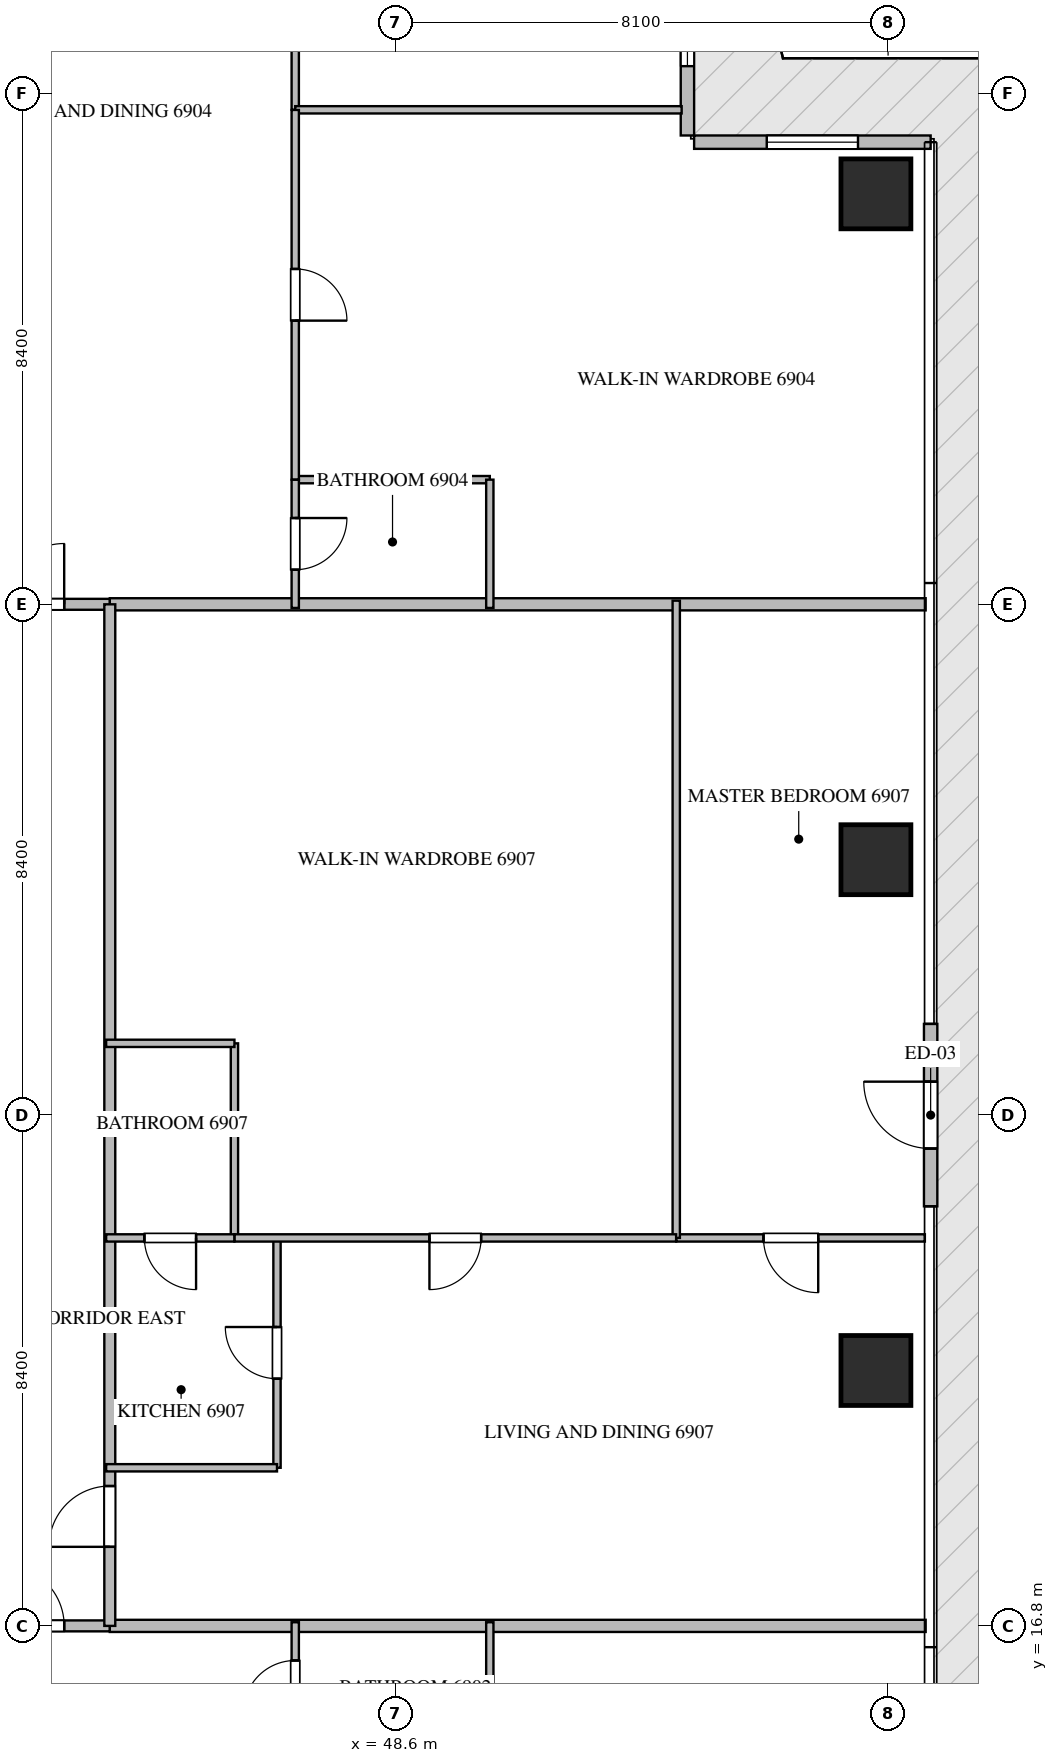
"""IFC4 building model, lengths in metres.
Left out: names, types, materials, properties, quantities, classifications, styles, units other than length and angle.
Written with IfcOpenShell. Run it as: python <this file> out.ifc"""

import sys

from ifc_helpers import new_model, si_unit, direction, frame, frame_2d, origin, origin_2d, place, context, subcontext, project, spatial, rectangle, extrude, source, transform, mapped, element, fill, save


model = new_model("IFC4")
c1 = context("Model", 3, precision=1e-05, world=origin(), true_north=direction((0.0, 1.0)))
c2 = subcontext(c1, "Body", "Model", "MODEL_VIEW")
j1 = project(units=[si_unit("LENGTHUNIT", "METRE"), si_unit("PLANEANGLEUNIT", "RADIAN")], contexts=[c1])
p1 = place(None, origin())
s1 = spatial("IfcSite", under=j1, at=p1, CompositionType="ELEMENT")
p2 = place(p1, origin())
s2 = spatial("IfcBuilding", under=s1, at=p2, CompositionType="ELEMENT")
p3 = place(p2, frame((0.0, 0.0, 275.9)))
s3 = spatial("IfcBuildingStorey", under=s2, at=p3, CompositionType="ELEMENT", Elevation=275.9)
m1 = source(origin(), c2, "Body", "SweptSolid", [
    extrude(rectangle(XDim=1.15, YDim=1.15, at=origin_2d()), origin(), (0.0, 0.0, 1.0), 3.85),
])
for number, where, z_axis, x_axis in (
    (1, (56.5, 21.0, -0.26), (0.0, 0.0, 1.0), (1.0, 0.0, 0.0)),
    (2, (56.5, 29.4, -0.26), (0.0, 0.0, 1.0), (1.0, 0.0, 0.0)),
    (3, (56.5, 40.35, -0.26), (0.0, 0.0, 1.0), (1.0, 0.0, 0.0)),
):
    element("IfcColumn", number, at=place(p3, frame(where, z_axis=z_axis, x_axis=x_axis)), inside=s3, PredefinedType="COLUMN", context=c2, shape_type="MappedRepresentation", body=[
        mapped(m1, transform((0.0, 0.0, 0.0), scale=1.0)),
    ])
p4 = place(p3, frame((57.4, 23.7, 0.0), z_axis=(0.0, 0.0, 1.0), x_axis=(0.0, 1.0, 0.0)))
e4 = element("IfcWall", 4, at=p4, inside=s3, PredefinedType="ELEMENTEDWALL", context=c2, shape_type="SweptSolid", body=[
    extrude(rectangle(XDim=3.0, YDim=0.22, at=frame_2d((1.5, 0.0))), origin(), (0.0, 0.0, 1.0), 3.575),
])
p5 = place(p4, frame((0.95, 0.0, 0.0)))
e5 = element("IfcOpeningElement", 5, at=p5, cuts=e4, PredefinedType="OPENING", context=c2, shape_type="SweptSolid", body=[
    extrude(rectangle(XDim=1.1, YDim=2.2, at=frame_2d((0.55, 1.1))), frame((0.0, 0.12, 0.0), z_axis=(0.0, -1.0, 0.0), x_axis=(1.0, 0.0, 0.0)), (0.0, 0.0, 1.0), 0.24),
])
p6 = place(p3, frame((57.4, 41.2, 0.0), z_axis=(0.0, 0.0, 1.0), x_axis=(-1.0, 0.0, 0.0)))
e6 = element("IfcWall", 6, at=p6, inside=s3, PredefinedType="ELEMENTEDWALL", context=c2, shape_type="SweptSolid", body=[
    extrude(rectangle(XDim=3.89, YDim=0.22, at=frame_2d((1.945, 0.0))), origin(), (0.0, 0.0, 1.0), 3.575),
])
p7 = place(p6, frame((1.195, 0.0, 0.65)))
e7 = element("IfcOpeningElement", 7, at=p7, cuts=e6, PredefinedType="OPENING", context=c2, shape_type="SweptSolid", body=[
    extrude(rectangle(XDim=1.5, YDim=2.25, at=frame_2d((0.75, 1.125))), frame((0.0, 0.12, 0.0), z_axis=(0.0, -1.0, 0.0), x_axis=(1.0, 0.0, 0.0)), (0.0, 0.0, 1.0), 0.24),
])
p8 = place(p3, frame((53.4, 41.31, 0.0), z_axis=(0.0, 0.0, 1.0), x_axis=(0.0, 1.0, 0.0)))
e8 = element("IfcWall", 8, at=p8, inside=s3, PredefinedType="ELEMENTEDWALL", context=c2, shape_type="SweptSolid", body=[
    extrude(rectangle(XDim=3.78, YDim=0.22, at=frame_2d((1.89, 0.0))), origin(), (0.0, 0.0, 1.0), 3.575),
])
p9 = place(p8, frame((1.14, 0.0, 0.65)))
e9 = element("IfcOpeningElement", 9, at=p9, cuts=e8, PredefinedType="OPENING", context=c2, shape_type="SweptSolid", body=[
    extrude(rectangle(XDim=1.5, YDim=2.25, at=frame_2d((0.75, 1.125))), frame((0.0, 0.12, 0.0), z_axis=(0.0, -1.0, 0.0), x_axis=(1.0, 0.0, 0.0)), (0.0, 0.0, 1.0), 0.24),
])
for number, where, z_axis, x_axis in (
    (10, (43.9, 16.8, 0.0), (0.0, 0.0, 1.0), (1.0, 0.0, 0.0)),
    (11, (43.9, 33.6, 0.0), (0.0, 0.0, 1.0), (1.0, 0.0, 0.0)),
):
    element("IfcWall", number, at=place(p3, frame(where, z_axis=z_axis, x_axis=x_axis)), inside=s3, PredefinedType="PARTITIONING", context=c2, shape_type="SweptSolid", body=[
        extrude(rectangle(XDim=13.418, YDim=0.2, at=frame_2d((6.709, 0.0))), origin(), (0.0, 0.0, 1.0), 3.59),
    ])
p10 = place(p3, frame((41.402, 16.8, 0.0), z_axis=(0.0, 0.0, 1.0), x_axis=(1.0, 0.0, 0.0)))
e12 = element("IfcWall", 12, at=p10, inside=s3, PredefinedType="PARTITIONING", context=c2, shape_type="SweptSolid", body=[
    extrude(rectangle(XDim=2.496, YDim=0.18, at=frame_2d((1.248, 0.0))), origin(), (0.0, 0.0, 1.0), 3.59),
])
p11 = place(p10, frame((0.748, 0.0, 0.0)))
e13 = element("IfcOpeningElement", 13, at=p11, cuts=e12, PredefinedType="OPENING", context=c2, shape_type="SweptSolid", body=[
    extrude(rectangle(XDim=1.0, YDim=2.15, at=frame_2d((0.5, 1.075))), frame((0.0, 0.1, 0.0), z_axis=(0.0, -1.0, 0.0), x_axis=(1.0, 0.0, 0.0)), (0.0, 0.0, 1.0), 0.2),
])
p12 = place(p3, frame((41.402, 33.6, 0.0), z_axis=(0.0, 0.0, 1.0), x_axis=(1.0, 0.0, 0.0)))
e14 = element("IfcWall", 14, at=p12, inside=s3, PredefinedType="PARTITIONING", context=c2, shape_type="SweptSolid", body=[
    extrude(rectangle(XDim=2.496, YDim=0.18, at=frame_2d((1.248, 0.0))), origin(), (0.0, 0.0, 1.0), 3.59),
])
p13 = place(p12, frame((0.748, 0.0, 0.0)))
e15 = element("IfcOpeningElement", 15, at=p13, cuts=e14, PredefinedType="OPENING", context=c2, shape_type="SweptSolid", body=[
    extrude(rectangle(XDim=1.0, YDim=2.15, at=frame_2d((0.5, 1.075))), frame((0.0, 0.1, 0.0), z_axis=(0.0, -1.0, 0.0), x_axis=(1.0, 0.0, 0.0)), (0.0, 0.0, 1.0), 0.2),
])
p14 = place(p3, frame((43.9, 16.8, 0.0), z_axis=(0.0, 0.0, 1.0), x_axis=(0.0, 1.0, 0.0)))
e16 = element("IfcWall", 16, at=p14, inside=s3, PredefinedType="PARTITIONING", context=c2, shape_type="SweptSolid", body=[
    extrude(rectangle(XDim=16.8, YDim=0.18, at=frame_2d((8.4, 0.0))), origin(), (0.0, 0.0, 1.0), 3.59),
])
p15 = place(p14, frame((1.3, 0.0, 0.0)))
e17 = element("IfcOpeningElement", 17, at=p15, cuts=e16, PredefinedType="OPENING", context=c2, shape_type="SweptSolid", body=[
    extrude(rectangle(XDim=1.0, YDim=2.15, at=frame_2d((0.5, 1.075))), frame((0.0, 0.1, 0.0), z_axis=(0.0, -1.0, 0.0), x_axis=(1.0, 0.0, 0.0)), (0.0, 0.0, 1.0), 0.2),
])
p16 = place(p3, frame((50.15, 14.75, 0.0), z_axis=(0.0, 0.0, 1.0), x_axis=(0.0, 1.0, 0.0)))
e18 = element("IfcWall", 18, at=p16, inside=s3, PredefinedType="PARTITIONING", context=c2, shape_type="SweptSolid", body=[
    extrude(rectangle(XDim=2.11, YDim=0.12, at=frame_2d((1.055, 0.0))), origin(), (0.0, 0.0, 1.0), 3.59),
])
p17 = place(p3, frame((46.95, 14.752, 0.0), z_axis=(0.0, 0.0, 1.0), x_axis=(0.0, 1.0, 0.0)))
e19 = element("IfcWall", 19, at=p17, inside=s3, PredefinedType="PARTITIONING", context=c2, shape_type="SweptSolid", body=[
    extrude(rectangle(XDim=2.108, YDim=0.12, at=frame_2d((1.054, 0.0))), origin(), (0.0, 0.0, 1.0), 3.59),
])
p18 = place(p17, frame((0.629, 0.0, 0.0)))
e20 = element("IfcOpeningElement", 20, at=p18, cuts=e19, PredefinedType="OPENING", context=c2, shape_type="SweptSolid", body=[
    extrude(rectangle(XDim=0.85, YDim=2.1, at=frame_2d((0.425, 1.05))), frame((0.0, 0.07, 0.0), z_axis=(0.0, -1.0, 0.0), x_axis=(1.0, 0.0, 0.0)), (0.0, 0.0, 1.0), 0.14),
])
p19 = place(p3, frame((46.95, 49.105, 0.0), z_axis=(0.0, 0.0, 1.0), x_axis=(0.0, -1.0, 0.0)))
e21 = element("IfcWall", 21, at=p19, inside=s3, PredefinedType="PARTITIONING", context=c2, shape_type="SweptSolid", body=[
    extrude(rectangle(XDim=7.373, YDim=0.12, at=frame_2d((3.687, 0.0))), origin(), (0.0, 0.0, 1.0), 3.59),
])
p20 = place(p19, frame((3.56, 0.0, 0.0)))
e22 = element("IfcOpeningElement", 22, at=p20, cuts=e21, PredefinedType="OPENING", context=c2, shape_type="SweptSolid", body=[
    extrude(rectangle(XDim=0.9, YDim=2.1, at=frame_2d((0.45, 1.05))), frame((0.0, 0.07, 0.0), z_axis=(0.0, -1.0, 0.0), x_axis=(1.0, 0.0, 0.0)), (0.0, 0.0, 1.0), 0.14),
])
p21 = place(p3, frame((46.95, 41.732, 0.0), z_axis=(0.0, 0.0, 1.0), x_axis=(1.0, 0.0, 0.0)))
e23 = element("IfcWall", 23, at=p21, inside=s3, PredefinedType="PARTITIONING", context=c2, shape_type="SweptSolid", body=[
    extrude(rectangle(XDim=6.355, YDim=0.12, at=frame_2d((3.177, 0.0))), origin(), (0.0, 0.0, 1.0), 3.59),
])
p22 = place(p3, frame((46.95, 35.65, 0.0), z_axis=(0.0, 0.0, 1.0), x_axis=(1.0, 0.0, 0.0)))
e24 = element("IfcWall", 24, at=p22, inside=s3, PredefinedType="PARTITIONING", context=c2, shape_type="SweptSolid", body=[
    extrude(rectangle(XDim=3.2, YDim=0.12, at=frame_2d((1.6, 0.0))), origin(), (0.0, 0.0, 1.0), 3.59),
])
p23 = place(p3, frame((50.15, 35.65, 0.0), z_axis=(0.0, 0.0, 1.0), x_axis=(0.0, -1.0, 0.0)))
e25 = element("IfcWall", 25, at=p23, inside=s3, PredefinedType="PARTITIONING", context=c2, shape_type="SweptSolid", body=[
    extrude(rectangle(XDim=2.11, YDim=0.12, at=frame_2d((1.055, 0.0))), origin(), (0.0, 0.0, 1.0), 3.59),
])
p24 = place(p3, frame((46.95, 41.73, 0.0), z_axis=(0.0, 0.0, 1.0), x_axis=(0.0, -1.0, 0.0)))
e26 = element("IfcWall", 26, at=p24, inside=s3, PredefinedType="PARTITIONING", context=c2, shape_type="SweptSolid", body=[
    extrude(rectangle(XDim=6.08, YDim=0.12, at=frame_2d((3.04, 0.0))), origin(), (0.0, 0.0, 1.0), 3.59),
])
p25 = place(p24, frame((2.615, 0.0, 0.0)))
e27 = element("IfcOpeningElement", 27, at=p25, cuts=e26, PredefinedType="OPENING", context=c2, shape_type="SweptSolid", body=[
    extrude(rectangle(XDim=0.85, YDim=2.1, at=frame_2d((0.425, 1.05))), frame((0.0, 0.07, 0.0), z_axis=(0.0, -1.0, 0.0), x_axis=(1.0, 0.0, 0.0)), (0.0, 0.0, 1.0), 0.14),
])
p26 = place(p3, frame((46.95, 35.648, 0.0), z_axis=(0.0, 0.0, 1.0), x_axis=(0.0, -1.0, 0.0)))
e28 = element("IfcWall", 28, at=p26, inside=s3, PredefinedType="PARTITIONING", context=c2, shape_type="SweptSolid", body=[
    extrude(rectangle(XDim=2.108, YDim=0.12, at=frame_2d((1.054, 0.0))), origin(), (0.0, 0.0, 1.0), 3.59),
])
p27 = place(p26, frame((0.629, 0.0, 0.0)))
e29 = element("IfcOpeningElement", 29, at=p27, cuts=e28, PredefinedType="OPENING", context=c2, shape_type="SweptSolid", body=[
    extrude(rectangle(XDim=0.85, YDim=2.1, at=frame_2d((0.425, 1.05))), frame((0.0, 0.07, 0.0), z_axis=(0.0, -1.0, 0.0), x_axis=(1.0, 0.0, 0.0)), (0.0, 0.0, 1.0), 0.14),
])
p28 = place(p3, frame((46.65, 19.4, 0.0), z_axis=(0.0, 0.0, 1.0), x_axis=(0.0, 1.0, 0.0)))
e30 = element("IfcWall", 30, at=p28, inside=s3, PredefinedType="PARTITIONING", context=c2, shape_type="SweptSolid", body=[
    extrude(rectangle(XDim=3.78, YDim=0.12, at=frame_2d((1.89, 0.0))), origin(), (0.0, 0.0, 1.0), 3.59),
])
p29 = place(p28, frame((1.465, 0.0, 0.0)))
e31 = element("IfcOpeningElement", 31, at=p29, cuts=e30, PredefinedType="OPENING", context=c2, shape_type="SweptSolid", body=[
    extrude(rectangle(XDim=0.85, YDim=2.1, at=frame_2d((0.425, 1.05))), frame((0.0, 0.07, 0.0), z_axis=(0.0, -1.0, 0.0), x_axis=(1.0, 0.0, 0.0)), (0.0, 0.0, 1.0), 0.14),
])
p30 = place(p3, frame((46.65, 19.4, 0.0), z_axis=(0.0, 0.0, 1.0), x_axis=(-1.0, 0.0, 0.0)))
e32 = element("IfcWall", 32, at=p30, inside=s3, PredefinedType="PARTITIONING", context=c2, shape_type="SweptSolid", body=[
    extrude(rectangle(XDim=2.81, YDim=0.12, at=frame_2d((1.405, 0.0))), origin(), (0.0, 0.0, 1.0), 3.59),
])
p31 = place(p3, frame((57.305, 23.18, 0.0), z_axis=(0.0, 0.0, 1.0), x_axis=(-1.0, 0.0, 0.0)))
e33 = element("IfcWall", 33, at=p31, inside=s3, PredefinedType="PARTITIONING", context=c2, shape_type="SweptSolid", body=[
    extrude(rectangle(XDim=4.089, YDim=0.12, at=frame_2d((2.044, 0.0))), origin(), (0.0, 0.0, 1.0), 3.59),
])
p32 = place(p31, frame((1.754, 0.0, 0.0)))
e34 = element("IfcOpeningElement", 34, at=p32, cuts=e33, PredefinedType="OPENING", context=c2, shape_type="SweptSolid", body=[
    extrude(rectangle(XDim=0.9, YDim=2.1, at=frame_2d((0.45, 1.05))), frame((0.0, 0.07, 0.0), z_axis=(0.0, -1.0, 0.0), x_axis=(1.0, 0.0, 0.0)), (0.0, 0.0, 1.0), 0.14),
])
p33 = place(p3, frame((53.216, 23.18, 0.0), z_axis=(0.0, 0.0, 1.0), x_axis=(0.0, 1.0, 0.0)))
e35 = element("IfcWall", 35, at=p33, inside=s3, PredefinedType="PARTITIONING", context=c2, shape_type="SweptSolid", body=[
    extrude(rectangle(XDim=10.48, YDim=0.12, at=frame_2d((5.24, 0.0))), origin(), (0.0, 0.0, 1.0), 3.59),
])
p34 = place(p3, frame((45.95, 23.18, 0.0), z_axis=(0.0, 0.0, 1.0), x_axis=(0.0, 1.0, 0.0)))
e36 = element("IfcWall", 36, at=p34, inside=s3, PredefinedType="PARTITIONING", context=c2, shape_type="SweptSolid", body=[
    extrude(rectangle(XDim=3.2, YDim=0.12, at=frame_2d((1.6, 0.0))), origin(), (0.0, 0.0, 1.0), 3.59),
])
p35 = place(p3, frame((45.95, 26.38, 0.0), z_axis=(0.0, 0.0, 1.0), x_axis=(-1.0, 0.0, 0.0)))
e37 = element("IfcWall", 37, at=p35, inside=s3, PredefinedType="PARTITIONING", context=c2, shape_type="SweptSolid", body=[
    extrude(rectangle(XDim=2.11, YDim=0.12, at=frame_2d((1.055, 0.0))), origin(), (0.0, 0.0, 1.0), 3.59),
])
p36 = place(p3, frame((53.214, 23.18, 0.0), z_axis=(0.0, 0.0, 1.0), x_axis=(-1.0, 0.0, 0.0)))
e38 = element("IfcWall", 38, at=p36, inside=s3, PredefinedType="PARTITIONING", context=c2, shape_type="SweptSolid", body=[
    extrude(rectangle(XDim=7.264, YDim=0.12, at=frame_2d((3.632, 0.0))), origin(), (0.0, 0.0, 1.0), 3.59),
])
p37 = place(p36, frame((3.207, 0.0, 0.0)))
e39 = element("IfcOpeningElement", 39, at=p37, cuts=e38, PredefinedType="OPENING", context=c2, shape_type="SweptSolid", body=[
    extrude(rectangle(XDim=0.85, YDim=2.1, at=frame_2d((0.425, 1.05))), frame((0.0, 0.07, 0.0), z_axis=(0.0, -1.0, 0.0), x_axis=(1.0, 0.0, 0.0)), (0.0, 0.0, 1.0), 0.14),
])
p38 = place(p3, frame((45.948, 23.18, 0.0), z_axis=(0.0, 0.0, 1.0), x_axis=(-1.0, 0.0, 0.0)))
e40 = element("IfcWall", 40, at=p38, inside=s3, PredefinedType="PARTITIONING", context=c2, shape_type="SweptSolid", body=[
    extrude(rectangle(XDim=2.108, YDim=0.12, at=frame_2d((1.054, 0.0))), origin(), (0.0, 0.0, 1.0), 3.59),
])
p39 = place(p38, frame((0.629, 0.0, 0.0)))
e41 = element("IfcOpeningElement", 41, at=p39, cuts=e40, PredefinedType="OPENING", context=c2, shape_type="SweptSolid", body=[
    extrude(rectangle(XDim=0.85, YDim=2.1, at=frame_2d((0.425, 1.05))), frame((0.0, 0.07, 0.0), z_axis=(0.0, -1.0, 0.0), x_axis=(1.0, 0.0, 0.0)), (0.0, 0.0, 1.0), 0.14),
])
m2 = source(origin(), c2, "Body", "SweptSolid", [
    extrude(rectangle(XDim=1.1, YDim=2.2, at=frame_2d((0.55, 1.1))), frame((0.0, 0.025, 0.0), z_axis=(0.0, -1.0, 0.0), x_axis=(1.0, 0.0, 0.0)), (0.0, 0.0, 1.0), 0.05),
])
p40 = place(p5, origin())
e42 = element("IfcDoor", 42, at=p40, inside=s3, OperationType="SINGLE_SWING_RIGHT", PredefinedType="DOOR", context=c2, shape_type="MappedRepresentation", body=[
    mapped(m2, transform((0.0, 0.0, 0.0), scale=1.0)),
])
fill(e5, e42)
m3 = source(origin(), c2, "Body", "SweptSolid", [
    extrude(rectangle(XDim=1.5, YDim=2.25, at=frame_2d((0.75, 1.125))), frame((0.0, 0.03, 0.0), z_axis=(0.0, -1.0, 0.0), x_axis=(1.0, 0.0, 0.0)), (0.0, 0.0, 1.0), 0.06),
])
p41 = place(p7, origin())
e43 = element("IfcWindow", 43, at=p41, inside=s3, PartitioningType="SINGLE_PANEL", PredefinedType="WINDOW", context=c2, shape_type="MappedRepresentation", body=[
    mapped(m3, transform((0.0, 0.0, 0.0), scale=1.0)),
])
fill(e7, e43)
p42 = place(p9, origin())
e44 = element("IfcWindow", 44, at=p42, inside=s3, PartitioningType="SINGLE_PANEL", PredefinedType="WINDOW", context=c2, shape_type="MappedRepresentation", body=[
    mapped(m3, transform((0.0, 0.0, 0.0), scale=1.0)),
])
fill(e9, e44)
m4 = source(origin(), c2, "Body", "SweptSolid", [
    extrude(rectangle(XDim=1.0, YDim=2.15, at=frame_2d((0.5, 1.075))), frame((0.0, 0.025, 0.0), z_axis=(0.0, -1.0, 0.0), x_axis=(1.0, 0.0, 0.0)), (0.0, 0.0, 1.0), 0.05),
])
p43 = place(p11, origin())
e45 = element("IfcDoor", 45, at=p43, inside=s3, OperationType="SINGLE_SWING_LEFT", PredefinedType="DOOR", context=c2, shape_type="MappedRepresentation", body=[
    mapped(m4, transform((0.0, 0.0, 0.0), scale=1.0)),
])
fill(e13, e45)
p44 = place(p13, origin())
e46 = element("IfcDoor", 46, at=p44, inside=s3, OperationType="SINGLE_SWING_RIGHT", PredefinedType="DOOR", context=c2, shape_type="MappedRepresentation", body=[
    mapped(m4, transform((0.0, 0.0, 0.0), scale=1.0)),
])
fill(e15, e46)
p45 = place(p15, origin())
e47 = element("IfcDoor", 47, at=p45, inside=s3, OperationType="SINGLE_SWING_LEFT", PredefinedType="DOOR", context=c2, shape_type="MappedRepresentation", body=[
    mapped(m4, transform((0.0, 0.0, 0.0), scale=1.0)),
])
fill(e17, e47)
m5 = source(origin(), c2, "Body", "SweptSolid", [
    extrude(rectangle(XDim=0.85, YDim=2.1, at=frame_2d((0.425, 1.05))), frame((0.0, 0.025, 0.0), z_axis=(0.0, -1.0, 0.0), x_axis=(1.0, 0.0, 0.0)), (0.0, 0.0, 1.0), 0.05),
])
p46 = place(p18, origin())
e48 = element("IfcDoor", 48, at=p46, inside=s3, OperationType="SINGLE_SWING_LEFT", PredefinedType="DOOR", context=c2, shape_type="MappedRepresentation", body=[
    mapped(m5, transform((0.0, 0.0, 0.0), scale=1.0)),
])
fill(e20, e48)
p47 = place(p25, origin())
e49 = element("IfcDoor", 49, at=p47, inside=s3, OperationType="SINGLE_SWING_RIGHT", PredefinedType="DOOR", context=c2, shape_type="MappedRepresentation", body=[
    mapped(m5, transform((0.0, 0.0, 0.0), scale=1.0)),
])
fill(e27, e49)
p48 = place(p27, origin())
e50 = element("IfcDoor", 50, at=p48, inside=s3, OperationType="SINGLE_SWING_LEFT", PredefinedType="DOOR", context=c2, shape_type="MappedRepresentation", body=[
    mapped(m5, transform((0.0, 0.0, 0.0), scale=1.0)),
])
fill(e29, e50)
p49 = place(p29, origin())
e51 = element("IfcDoor", 51, at=p49, inside=s3, OperationType="SINGLE_SWING_RIGHT", PredefinedType="DOOR", context=c2, shape_type="MappedRepresentation", body=[
    mapped(m5, transform((0.0, 0.0, 0.0), scale=1.0)),
])
fill(e31, e51)
m6 = source(origin(), c2, "Body", "SweptSolid", [
    extrude(rectangle(XDim=0.9, YDim=2.1, at=frame_2d((0.45, 1.05))), frame((0.0, 0.025, 0.0), z_axis=(0.0, -1.0, 0.0), x_axis=(1.0, 0.0, 0.0)), (0.0, 0.0, 1.0), 0.05),
])
p50 = place(p32, origin())
e52 = element("IfcDoor", 52, at=p50, inside=s3, OperationType="SINGLE_SWING_LEFT", PredefinedType="DOOR", context=c2, shape_type="MappedRepresentation", body=[
    mapped(m6, transform((0.0, 0.0, 0.0), scale=1.0)),
])
fill(e34, e52)
p51 = place(p37, origin())
e53 = element("IfcDoor", 53, at=p51, inside=s3, OperationType="SINGLE_SWING_RIGHT", PredefinedType="DOOR", context=c2, shape_type="MappedRepresentation", body=[
    mapped(m5, transform((0.0, 0.0, 0.0), scale=1.0)),
])
fill(e39, e53)
p52 = place(p39, origin())
e54 = element("IfcDoor", 54, at=p52, inside=s3, OperationType="SINGLE_SWING_LEFT", PredefinedType="DOOR", context=c2, shape_type="MappedRepresentation", body=[
    mapped(m5, transform((0.0, 0.0, 0.0), scale=1.0)),
])
fill(e41, e54)
save(model, sys.argv[1])
